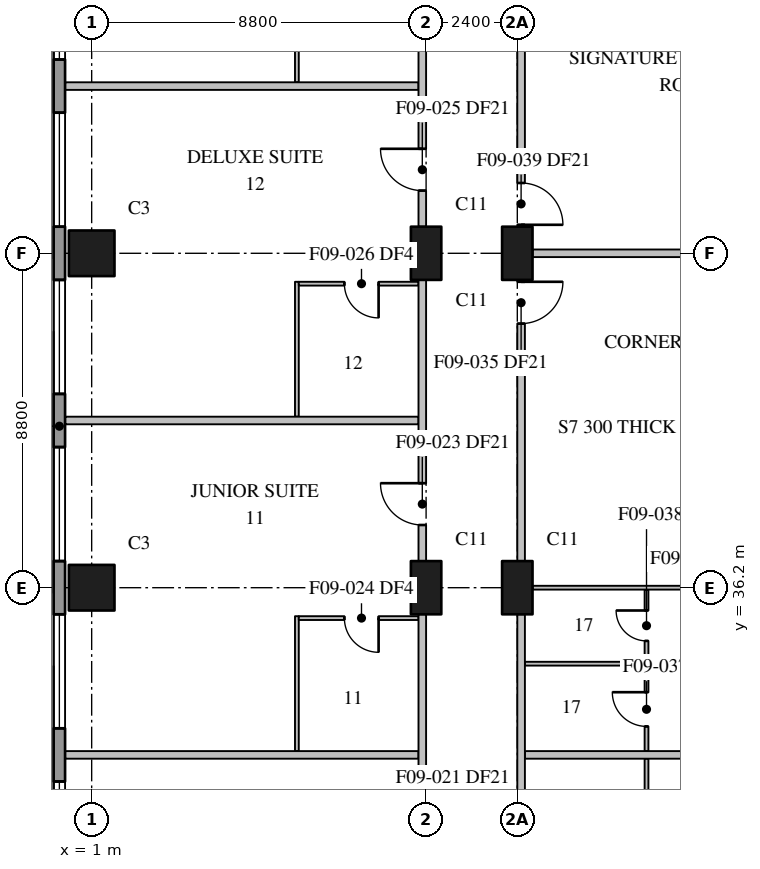
"""IFC4 building model, lengths in metres.
Left out: names, types, materials, properties, quantities, classifications, styles, units other than length and angle.
Written with IfcOpenShell. Run it as: python <this file> out.ifc"""

import sys

from ifc_helpers import new_model, si_unit, direction, frame, frame_2d, origin, origin_2d, place, context, subcontext, project, spatial, rectangle, extrude, element, fill, save


model = new_model("IFC4")
c1 = context("Model", 3, precision=1e-05, world=origin(), true_north=direction((0.0, 1.0)))
c2 = subcontext(c1, "Body", "Model", "MODEL_VIEW")
j1 = project(units=[si_unit("LENGTHUNIT", "METRE"), si_unit("PLANEANGLEUNIT", "RADIAN")], contexts=[c1])
p1 = place(None, origin())
s1 = spatial("IfcSite", under=j1, at=p1, CompositionType="ELEMENT")
p2 = place(p1, origin())
s2 = spatial("IfcBuilding", under=s1, at=p2, CompositionType="ELEMENT")
p3 = place(p2, frame((0.0, 0.0, 98.2)))
s3 = spatial("IfcBuildingStorey", under=s2, at=p3, CompositionType="ELEMENT", Elevation=98.2)
for number, where, z_axis, x_axis in (
    (1, (1.0, 36.2, 0.0), (0.0, 0.0, 1.0), (1.0, 0.0, 0.0)),
    (2, (1.0, 45.0, 0.0), (0.0, 0.0, 1.0), (1.0, 0.0, 0.0)),
):
    element("IfcColumn", number, at=place(p3, frame(where, z_axis=z_axis, x_axis=x_axis)), inside=s3, PredefinedType="COLUMN", context=c2, shape_type="SweptSolid", body=[
        extrude(rectangle(XDim=1.2, YDim=1.2, at=origin_2d()), origin(), (0.0, 0.0, 1.0), 3.7),
    ])
for number, where, z_axis, x_axis in (
    (3, (9.8, 36.2, 0.0), (0.0, 0.0, 1.0), (0.0, 1.0, 0.0)),
    (4, (9.8, 45.0, 0.0), (0.0, 0.0, 1.0), (0.0, 1.0, 0.0)),
    (5, (12.2, 36.2, 0.0), (0.0, 0.0, 1.0), (0.0, 1.0, 0.0)),
    (6, (12.2, 45.0, 0.0), (0.0, 0.0, 1.0), (0.0, 1.0, 0.0)),
):
    element("IfcColumn", number, at=place(p3, frame(where, z_axis=z_axis, x_axis=x_axis)), inside=s3, PredefinedType="COLUMN", context=c2, shape_type="SweptSolid", body=[
        extrude(rectangle(XDim=1.4, YDim=0.8, at=origin_2d()), origin(), (0.0, 0.0, 1.0), 3.7),
    ])
p4 = place(p3, frame((0.15, 78.7, 0.0), z_axis=(0.0, 0.0, 1.0), x_axis=(0.0, -1.0, 0.0)))
e7 = element("IfcWall", 7, at=p4, inside=s3, PredefinedType="STANDARD", context=c2, shape_type="SweptSolid", body=[
    extrude(rectangle(XDim=76.5, YDim=0.3, at=frame_2d((38.25, 0.0))), origin(), (0.0, 0.0, 1.0), 3.3),
])
p5 = place(p4, frame((3.6, 0.0, 0.75)))
e8 = element("IfcOpeningElement", 8, at=p5, cuts=e7, PredefinedType="OPENING", context=c2, shape_type="SweptSolid", body=[
    extrude(rectangle(XDim=3.0, YDim=2.3, at=frame_2d((1.5, 1.15))), frame((0.0, 0.16, 0.0), z_axis=(0.0, -1.0, 0.0), x_axis=(1.0, 0.0, 0.0)), (0.0, 0.0, 1.0), 0.32),
])
p6 = place(p4, frame((8.0, 0.0, 0.75)))
e9 = element("IfcOpeningElement", 9, at=p6, cuts=e7, PredefinedType="OPENING", context=c2, shape_type="SweptSolid", body=[
    extrude(rectangle(XDim=3.0, YDim=2.3, at=frame_2d((1.5, 1.15))), frame((0.0, 0.16, 0.0), z_axis=(0.0, -1.0, 0.0), x_axis=(1.0, 0.0, 0.0)), (0.0, 0.0, 1.0), 0.32),
])
p7 = place(p4, frame((12.4, 0.0, 0.75)))
e10 = element("IfcOpeningElement", 10, at=p7, cuts=e7, PredefinedType="OPENING", context=c2, shape_type="SweptSolid", body=[
    extrude(rectangle(XDim=3.0, YDim=2.3, at=frame_2d((1.5, 1.15))), frame((0.0, 0.16, 0.0), z_axis=(0.0, -1.0, 0.0), x_axis=(1.0, 0.0, 0.0)), (0.0, 0.0, 1.0), 0.32),
])
p8 = place(p4, frame((16.8, 0.0, 0.75)))
e11 = element("IfcOpeningElement", 11, at=p8, cuts=e7, PredefinedType="OPENING", context=c2, shape_type="SweptSolid", body=[
    extrude(rectangle(XDim=3.0, YDim=2.3, at=frame_2d((1.5, 1.15))), frame((0.0, 0.16, 0.0), z_axis=(0.0, -1.0, 0.0), x_axis=(1.0, 0.0, 0.0)), (0.0, 0.0, 1.0), 0.32),
])
p9 = place(p4, frame((21.2, 0.0, 0.75)))
e12 = element("IfcOpeningElement", 12, at=p9, cuts=e7, PredefinedType="OPENING", context=c2, shape_type="SweptSolid", body=[
    extrude(rectangle(XDim=3.0, YDim=2.3, at=frame_2d((1.5, 1.15))), frame((0.0, 0.16, 0.0), z_axis=(0.0, -1.0, 0.0), x_axis=(1.0, 0.0, 0.0)), (0.0, 0.0, 1.0), 0.32),
])
p10 = place(p4, frame((25.6, 0.0, 0.75)))
e13 = element("IfcOpeningElement", 13, at=p10, cuts=e7, PredefinedType="OPENING", context=c2, shape_type="SweptSolid", body=[
    extrude(rectangle(XDim=3.0, YDim=2.3, at=frame_2d((1.5, 1.15))), frame((0.0, 0.16, 0.0), z_axis=(0.0, -1.0, 0.0), x_axis=(1.0, 0.0, 0.0)), (0.0, 0.0, 1.0), 0.32),
])
p11 = place(p4, frame((30.0, 0.0, 0.75)))
e14 = element("IfcOpeningElement", 14, at=p11, cuts=e7, PredefinedType="OPENING", context=c2, shape_type="SweptSolid", body=[
    extrude(rectangle(XDim=3.0, YDim=2.3, at=frame_2d((1.5, 1.15))), frame((0.0, 0.16, 0.0), z_axis=(0.0, -1.0, 0.0), x_axis=(1.0, 0.0, 0.0)), (0.0, 0.0, 1.0), 0.32),
])
p12 = place(p4, frame((34.4, 0.0, 0.75)))
e15 = element("IfcOpeningElement", 15, at=p12, cuts=e7, PredefinedType="OPENING", context=c2, shape_type="SweptSolid", body=[
    extrude(rectangle(XDim=3.0, YDim=2.3, at=frame_2d((1.5, 1.15))), frame((0.0, 0.16, 0.0), z_axis=(0.0, -1.0, 0.0), x_axis=(1.0, 0.0, 0.0)), (0.0, 0.0, 1.0), 0.32),
])
p13 = place(p4, frame((38.8, 0.0, 0.75)))
e16 = element("IfcOpeningElement", 16, at=p13, cuts=e7, PredefinedType="OPENING", context=c2, shape_type="SweptSolid", body=[
    extrude(rectangle(XDim=3.0, YDim=2.3, at=frame_2d((1.5, 1.15))), frame((0.0, 0.16, 0.0), z_axis=(0.0, -1.0, 0.0), x_axis=(1.0, 0.0, 0.0)), (0.0, 0.0, 1.0), 0.32),
])
p14 = place(p4, frame((43.2, 0.0, 0.75)))
e17 = element("IfcOpeningElement", 17, at=p14, cuts=e7, PredefinedType="OPENING", context=c2, shape_type="SweptSolid", body=[
    extrude(rectangle(XDim=3.0, YDim=2.3, at=frame_2d((1.5, 1.15))), frame((0.0, 0.16, 0.0), z_axis=(0.0, -1.0, 0.0), x_axis=(1.0, 0.0, 0.0)), (0.0, 0.0, 1.0), 0.32),
])
p15 = place(p4, frame((47.6, 0.0, 0.75)))
e18 = element("IfcOpeningElement", 18, at=p15, cuts=e7, PredefinedType="OPENING", context=c2, shape_type="SweptSolid", body=[
    extrude(rectangle(XDim=3.0, YDim=2.3, at=frame_2d((1.5, 1.15))), frame((0.0, 0.16, 0.0), z_axis=(0.0, -1.0, 0.0), x_axis=(1.0, 0.0, 0.0)), (0.0, 0.0, 1.0), 0.32),
])
p16 = place(p4, frame((52.0, 0.0, 0.75)))
e19 = element("IfcOpeningElement", 19, at=p16, cuts=e7, PredefinedType="OPENING", context=c2, shape_type="SweptSolid", body=[
    extrude(rectangle(XDim=3.0, YDim=2.3, at=frame_2d((1.5, 1.15))), frame((0.0, 0.16, 0.0), z_axis=(0.0, -1.0, 0.0), x_axis=(1.0, 0.0, 0.0)), (0.0, 0.0, 1.0), 0.32),
])
p17 = place(p4, frame((56.4, 0.0, 0.75)))
e20 = element("IfcOpeningElement", 20, at=p17, cuts=e7, PredefinedType="OPENING", context=c2, shape_type="SweptSolid", body=[
    extrude(rectangle(XDim=3.0, YDim=2.3, at=frame_2d((1.5, 1.15))), frame((0.0, 0.16, 0.0), z_axis=(0.0, -1.0, 0.0), x_axis=(1.0, 0.0, 0.0)), (0.0, 0.0, 1.0), 0.32),
])
p18 = place(p4, frame((60.8, 0.0, 0.75)))
e21 = element("IfcOpeningElement", 21, at=p18, cuts=e7, PredefinedType="OPENING", context=c2, shape_type="SweptSolid", body=[
    extrude(rectangle(XDim=3.0, YDim=2.3, at=frame_2d((1.5, 1.15))), frame((0.0, 0.16, 0.0), z_axis=(0.0, -1.0, 0.0), x_axis=(1.0, 0.0, 0.0)), (0.0, 0.0, 1.0), 0.32),
])
p19 = place(p4, frame((65.2, 0.0, 0.75)))
e22 = element("IfcOpeningElement", 22, at=p19, cuts=e7, PredefinedType="OPENING", context=c2, shape_type="SweptSolid", body=[
    extrude(rectangle(XDim=3.0, YDim=2.3, at=frame_2d((1.5, 1.15))), frame((0.0, 0.16, 0.0), z_axis=(0.0, -1.0, 0.0), x_axis=(1.0, 0.0, 0.0)), (0.0, 0.0, 1.0), 0.32),
])
p20 = place(p4, frame((69.6, 0.0, 0.75)))
e23 = element("IfcOpeningElement", 23, at=p20, cuts=e7, PredefinedType="OPENING", context=c2, shape_type="SweptSolid", body=[
    extrude(rectangle(XDim=3.0, YDim=2.3, at=frame_2d((1.5, 1.15))), frame((0.0, 0.16, 0.0), z_axis=(0.0, -1.0, 0.0), x_axis=(1.0, 0.0, 0.0)), (0.0, 0.0, 1.0), 0.32),
])
p21 = place(p3, frame((9.7, 28.1, 0.0), z_axis=(0.0, 0.0, 1.0), x_axis=(0.0, 1.0, 0.0)))
e24 = element("IfcWall", 24, at=p21, inside=s3, PredefinedType="PARTITIONING", context=c2, shape_type="SweptSolid", body=[
    extrude(rectangle(XDim=7.4, YDim=0.2, at=frame_2d((3.7, 0.0))), origin(), (0.0, 0.0, 1.0), 3.3),
])
p22 = place(p21, frame((0.95, 0.0, 0.0)))
e25 = element("IfcOpeningElement", 25, at=p22, cuts=e24, PredefinedType="OPENING", context=c2, shape_type="SweptSolid", body=[
    extrude(rectangle(XDim=1.1, YDim=2.1, at=frame_2d((0.55, 1.05))), frame((0.0, 0.11, 0.0), z_axis=(0.0, -1.0, 0.0), x_axis=(1.0, 0.0, 0.0)), (0.0, 0.0, 1.0), 0.22),
])
p23 = place(p3, frame((9.7, 36.9, 0.0), z_axis=(0.0, 0.0, 1.0), x_axis=(0.0, 1.0, 0.0)))
e26 = element("IfcWall", 26, at=p23, inside=s3, PredefinedType="PARTITIONING", context=c2, shape_type="SweptSolid", body=[
    extrude(rectangle(XDim=7.4, YDim=0.2, at=frame_2d((3.7, 0.0))), origin(), (0.0, 0.0, 1.0), 3.3),
])
p24 = place(p23, frame((0.95, 0.0, 0.0)))
e27 = element("IfcOpeningElement", 27, at=p24, cuts=e26, PredefinedType="OPENING", context=c2, shape_type="SweptSolid", body=[
    extrude(rectangle(XDim=1.1, YDim=2.1, at=frame_2d((0.55, 1.05))), frame((0.0, 0.11, 0.0), z_axis=(0.0, -1.0, 0.0), x_axis=(1.0, 0.0, 0.0)), (0.0, 0.0, 1.0), 0.22),
])
p25 = place(p3, frame((9.7, 45.7, 0.0), z_axis=(0.0, 0.0, 1.0), x_axis=(0.0, 1.0, 0.0)))
e28 = element("IfcWall", 28, at=p25, inside=s3, PredefinedType="PARTITIONING", context=c2, shape_type="SweptSolid", body=[
    extrude(rectangle(XDim=7.4, YDim=0.2, at=frame_2d((3.7, 0.0))), origin(), (0.0, 0.0, 1.0), 3.3),
])
p26 = place(p25, frame((0.95, 0.0, 0.0)))
e29 = element("IfcOpeningElement", 29, at=p26, cuts=e28, PredefinedType="OPENING", context=c2, shape_type="SweptSolid", body=[
    extrude(rectangle(XDim=1.1, YDim=2.1, at=frame_2d((0.55, 1.05))), frame((0.0, 0.11, 0.0), z_axis=(0.0, -1.0, 0.0), x_axis=(1.0, 0.0, 0.0)), (0.0, 0.0, 1.0), 0.22),
])
p27 = place(p3, frame((0.31, 31.8, 0.0), z_axis=(0.0, 0.0, 1.0), x_axis=(1.0, 0.0, 0.0)))
e30 = element("IfcWall", 30, at=p27, inside=s3, PredefinedType="PARTITIONING", context=c2, shape_type="SweptSolid", body=[
    extrude(rectangle(XDim=9.29, YDim=0.2, at=frame_2d((4.645, 0.0))), origin(), (0.0, 0.0, 1.0), 3.3),
])
p28 = place(p3, frame((12.4, 31.8, 0.0), z_axis=(0.0, 0.0, 1.0), x_axis=(1.0, 0.0, 0.0)))
e31 = element("IfcWall", 31, at=p28, inside=s3, PredefinedType="PARTITIONING", context=c2, shape_type="SweptSolid", body=[
    extrude(rectangle(XDim=14.27, YDim=0.2, at=frame_2d((7.135, 0.0))), origin(), (0.0, 0.0, 1.0), 3.3),
])
for number, where, z_axis, x_axis in (
    (32, (0.31, 40.6, 0.0), (0.0, 0.0, 1.0), (1.0, 0.0, 0.0)),
    (33, (0.31, 49.4, 0.0), (0.0, 0.0, 1.0), (1.0, 0.0, 0.0)),
):
    element("IfcWall", number, at=place(p3, frame(where, z_axis=z_axis, x_axis=x_axis)), inside=s3, PredefinedType="PARTITIONING", context=c2, shape_type="SweptSolid", body=[
        extrude(rectangle(XDim=9.29, YDim=0.2, at=frame_2d((4.645, 0.0))), origin(), (0.0, 0.0, 1.0), 3.3),
    ])
p29 = place(p3, frame((12.3, 28.1, 0.0), z_axis=(0.0, 0.0, 1.0), x_axis=(0.0, 1.0, 0.0)))
e34 = element("IfcWall", 34, at=p29, inside=s3, PredefinedType="PARTITIONING", context=c2, shape_type="SweptSolid", body=[
    extrude(rectangle(XDim=7.4, YDim=0.2, at=frame_2d((3.7, 0.0))), origin(), (0.0, 0.0, 1.0), 3.3),
])
p30 = place(p3, frame((12.3, 44.3, 0.0), z_axis=(0.0, 0.0, 1.0), x_axis=(0.0, -1.0, 0.0)))
e35 = element("IfcWall", 35, at=p30, inside=s3, PredefinedType="PARTITIONING", context=c2, shape_type="SweptSolid", body=[
    extrude(rectangle(XDim=7.4, YDim=0.2, at=frame_2d((3.7, 0.0))), origin(), (0.0, 0.0, 1.0), 3.3),
])
p31 = place(p30, frame((0.05, 0.0, 0.0)))
e36 = element("IfcOpeningElement", 36, at=p31, cuts=e35, PredefinedType="OPENING", context=c2, shape_type="SweptSolid", body=[
    extrude(rectangle(XDim=1.1, YDim=2.1, at=frame_2d((0.55, 1.05))), frame((0.0, 0.11, 0.0), z_axis=(0.0, -1.0, 0.0), x_axis=(1.0, 0.0, 0.0)), (0.0, 0.0, 1.0), 0.22),
])
p32 = place(p3, frame((12.3, 53.1, 0.0), z_axis=(0.0, 0.0, 1.0), x_axis=(0.0, -1.0, 0.0)))
e37 = element("IfcWall", 37, at=p32, inside=s3, PredefinedType="PARTITIONING", context=c2, shape_type="SweptSolid", body=[
    extrude(rectangle(XDim=7.4, YDim=0.2, at=frame_2d((3.7, 0.0))), origin(), (0.0, 0.0, 1.0), 3.3),
])
p33 = place(p32, frame((6.25, 0.0, 0.0)))
e38 = element("IfcOpeningElement", 38, at=p33, cuts=e37, PredefinedType="OPENING", context=c2, shape_type="SweptSolid", body=[
    extrude(rectangle(XDim=1.1, YDim=2.1, at=frame_2d((0.55, 1.05))), frame((0.0, 0.11, 0.0), z_axis=(0.0, -1.0, 0.0), x_axis=(1.0, 0.0, 0.0)), (0.0, 0.0, 1.0), 0.22),
])
p34 = place(p3, frame((12.6, 45.0, 0.0), z_axis=(0.0, 0.0, 1.0), x_axis=(1.0, 0.0, 0.0)))
e39 = element("IfcWall", 39, at=p34, inside=s3, PredefinedType="PARTITIONING", context=c2, shape_type="SweptSolid", body=[
    extrude(rectangle(XDim=7.8, YDim=0.2, at=frame_2d((3.9, 0.0))), origin(), (0.0, 0.0, 1.0), 3.3),
])
for number, where, z_axis, x_axis in (
    (40, (6.4, 31.9, 0.0), (0.0, 0.0, 1.0), (0.0, 1.0, 0.0)),
    (41, (6.4, 40.7, 0.0), (0.0, 0.0, 1.0), (0.0, 1.0, 0.0)),
    (42, (6.4, 49.5, 0.0), (0.0, 0.0, 1.0), (0.0, 1.0, 0.0)),
):
    element("IfcWall", number, at=place(p3, frame(where, z_axis=z_axis, x_axis=x_axis)), inside=s3, PredefinedType="PARTITIONING", context=c2, shape_type="SweptSolid", body=[
        extrude(rectangle(XDim=3.55, YDim=0.1, at=frame_2d((1.775, 0.0))), origin(), (0.0, 0.0, 1.0), 3.3),
    ])
p35 = place(p3, frame((9.6, 35.4, 0.0), z_axis=(0.0, 0.0, 1.0), x_axis=(-1.0, 0.0, 0.0)))
e43 = element("IfcWall", 43, at=p35, inside=s3, PredefinedType="PARTITIONING", context=c2, shape_type="SweptSolid", body=[
    extrude(rectangle(XDim=3.15, YDim=0.1, at=frame_2d((1.575, 0.0))), origin(), (0.0, 0.0, 1.0), 3.3),
])
p36 = place(p35, frame((1.05, 0.0, 0.0)))
e44 = element("IfcOpeningElement", 44, at=p36, cuts=e43, PredefinedType="OPENING", context=c2, shape_type="SweptSolid", body=[
    extrude(rectangle(XDim=0.9, YDim=2.1, at=frame_2d((0.45, 1.05))), frame((0.0, 0.06, 0.0), z_axis=(0.0, -1.0, 0.0), x_axis=(1.0, 0.0, 0.0)), (0.0, 0.0, 1.0), 0.12),
])
p37 = place(p3, frame((9.6, 44.2, 0.0), z_axis=(0.0, 0.0, 1.0), x_axis=(-1.0, 0.0, 0.0)))
e45 = element("IfcWall", 45, at=p37, inside=s3, PredefinedType="PARTITIONING", context=c2, shape_type="SweptSolid", body=[
    extrude(rectangle(XDim=3.15, YDim=0.1, at=frame_2d((1.575, 0.0))), origin(), (0.0, 0.0, 1.0), 3.3),
])
p38 = place(p37, frame((1.05, 0.0, 0.0)))
e46 = element("IfcOpeningElement", 46, at=p38, cuts=e45, PredefinedType="OPENING", context=c2, shape_type="SweptSolid", body=[
    extrude(rectangle(XDim=0.9, YDim=2.1, at=frame_2d((0.45, 1.05))), frame((0.0, 0.06, 0.0), z_axis=(0.0, -1.0, 0.0), x_axis=(1.0, 0.0, 0.0)), (0.0, 0.0, 1.0), 0.12),
])
p39 = place(p3, frame((15.6, 28.15, 0.0), z_axis=(0.0, 0.0, 1.0), x_axis=(0.0, 1.0, 0.0)))
e47 = element("IfcWall", 47, at=p39, inside=s3, PredefinedType="PARTITIONING", context=c2, shape_type="SweptSolid", body=[
    extrude(rectangle(XDim=3.55, YDim=0.1, at=frame_2d((1.775, 0.0))), origin(), (0.0, 0.0, 1.0), 3.3),
])
p40 = place(p3, frame((15.6, 31.9, 0.0), z_axis=(0.0, 0.0, 1.0), x_axis=(0.0, 1.0, 0.0)))
e48 = element("IfcWall", 48, at=p40, inside=s3, PredefinedType="PARTITIONING", context=c2, shape_type="SweptSolid", body=[
    extrude(rectangle(XDim=4.25, YDim=0.1, at=frame_2d((2.125, 0.0))), origin(), (0.0, 0.0, 1.0), 3.3),
])
p41 = place(p40, frame((0.65, 0.0, 0.0)))
e49 = element("IfcOpeningElement", 49, at=p41, cuts=e48, PredefinedType="OPENING", context=c2, shape_type="SweptSolid", body=[
    extrude(rectangle(XDim=0.9, YDim=2.1, at=frame_2d((0.45, 1.05))), frame((0.0, 0.06, 0.0), z_axis=(0.0, -1.0, 0.0), x_axis=(1.0, 0.0, 0.0)), (0.0, 0.0, 1.0), 0.12),
])
p42 = place(p40, frame((2.9, 0.0, 0.0)))
e50 = element("IfcOpeningElement", 50, at=p42, cuts=e48, PredefinedType="OPENING", context=c2, shape_type="SweptSolid", body=[
    extrude(rectangle(XDim=0.8, YDim=2.1, at=frame_2d((0.4, 1.05))), frame((0.0, 0.06, 0.0), z_axis=(0.0, -1.0, 0.0), x_axis=(1.0, 0.0, 0.0)), (0.0, 0.0, 1.0), 0.12),
])
p43 = place(p3, frame((20.4, 36.2, 0.0), z_axis=(0.0, 0.0, 1.0), x_axis=(-1.0, 0.0, 0.0)))
e51 = element("IfcWall", 51, at=p43, inside=s3, PredefinedType="PARTITIONING", context=c2, shape_type="SweptSolid", body=[
    extrude(rectangle(XDim=7.8, YDim=0.1, at=frame_2d((3.9, 0.0))), origin(), (0.0, 0.0, 1.0), 3.3),
])
p44 = place(p43, frame((2.7, 0.0, 0.0)))
e52 = element("IfcOpeningElement", 52, at=p44, cuts=e51, PredefinedType="OPENING", context=c2, shape_type="SweptSolid", body=[
    extrude(rectangle(XDim=1.0, YDim=2.1, at=frame_2d((0.5, 1.05))), frame((0.0, 0.06, 0.0), z_axis=(0.0, -1.0, 0.0), x_axis=(1.0, 0.0, 0.0)), (0.0, 0.0, 1.0), 0.12),
])
p45 = place(p3, frame((12.4, 34.2, 0.0), z_axis=(0.0, 0.0, 1.0), x_axis=(1.0, 0.0, 0.0)))
e53 = element("IfcWall", 53, at=p45, inside=s3, PredefinedType="PARTITIONING", context=c2, shape_type="SweptSolid", body=[
    extrude(rectangle(XDim=3.15, YDim=0.1, at=frame_2d((1.575, 0.0))), origin(), (0.0, 0.0, 1.0), 3.3),
])
p46 = place(p10, origin())
e54 = element("IfcWindow", 54, at=p46, inside=s3, PartitioningType="SINGLE_PANEL", PredefinedType="WINDOW", context=c2, shape_type="SweptSolid", body=[
    extrude(rectangle(XDim=3.0, YDim=2.3, at=frame_2d((1.5, 1.15))), frame((0.0, 0.03, 0.0), z_axis=(0.0, -1.0, 0.0), x_axis=(1.0, 0.0, 0.0)), (0.0, 0.0, 1.0), 0.06),
])
fill(e13, e54)
p47 = place(p11, origin())
e55 = element("IfcWindow", 55, at=p47, inside=s3, PartitioningType="SINGLE_PANEL", PredefinedType="WINDOW", context=c2, shape_type="SweptSolid", body=[
    extrude(rectangle(XDim=3.0, YDim=2.3, at=frame_2d((1.5, 1.15))), frame((0.0, 0.03, 0.0), z_axis=(0.0, -1.0, 0.0), x_axis=(1.0, 0.0, 0.0)), (0.0, 0.0, 1.0), 0.06),
])
fill(e14, e55)
p48 = place(p12, origin())
e56 = element("IfcWindow", 56, at=p48, inside=s3, PartitioningType="SINGLE_PANEL", PredefinedType="WINDOW", context=c2, shape_type="SweptSolid", body=[
    extrude(rectangle(XDim=3.0, YDim=2.3, at=frame_2d((1.5, 1.15))), frame((0.0, 0.03, 0.0), z_axis=(0.0, -1.0, 0.0), x_axis=(1.0, 0.0, 0.0)), (0.0, 0.0, 1.0), 0.06),
])
fill(e15, e56)
p49 = place(p13, origin())
e57 = element("IfcWindow", 57, at=p49, inside=s3, PartitioningType="SINGLE_PANEL", PredefinedType="WINDOW", context=c2, shape_type="SweptSolid", body=[
    extrude(rectangle(XDim=3.0, YDim=2.3, at=frame_2d((1.5, 1.15))), frame((0.0, 0.03, 0.0), z_axis=(0.0, -1.0, 0.0), x_axis=(1.0, 0.0, 0.0)), (0.0, 0.0, 1.0), 0.06),
])
fill(e16, e57)
p50 = place(p14, origin())
e58 = element("IfcWindow", 58, at=p50, inside=s3, PartitioningType="SINGLE_PANEL", PredefinedType="WINDOW", context=c2, shape_type="SweptSolid", body=[
    extrude(rectangle(XDim=3.0, YDim=2.3, at=frame_2d((1.5, 1.15))), frame((0.0, 0.03, 0.0), z_axis=(0.0, -1.0, 0.0), x_axis=(1.0, 0.0, 0.0)), (0.0, 0.0, 1.0), 0.06),
])
fill(e17, e58)
p51 = place(p15, origin())
e59 = element("IfcWindow", 59, at=p51, inside=s3, PartitioningType="SINGLE_PANEL", PredefinedType="WINDOW", context=c2, shape_type="SweptSolid", body=[
    extrude(rectangle(XDim=3.0, YDim=2.3, at=frame_2d((1.5, 1.15))), frame((0.0, 0.03, 0.0), z_axis=(0.0, -1.0, 0.0), x_axis=(1.0, 0.0, 0.0)), (0.0, 0.0, 1.0), 0.06),
])
fill(e18, e59)
p52 = place(p24, origin())
e60 = element("IfcDoor", 60, at=p52, inside=s3, OperationType="SINGLE_SWING_RIGHT", PredefinedType="DOOR", context=c2, shape_type="SweptSolid", body=[
    extrude(rectangle(XDim=1.1, YDim=2.1, at=frame_2d((0.55, 1.05))), frame((0.0, 0.025, 0.0), z_axis=(0.0, -1.0, 0.0), x_axis=(1.0, 0.0, 0.0)), (0.0, 0.0, 1.0), 0.05),
])
fill(e27, e60)
p53 = place(p36, origin())
e61 = element("IfcDoor", 61, at=p53, inside=s3, OperationType="SINGLE_SWING_LEFT", PredefinedType="DOOR", context=c2, shape_type="SweptSolid", body=[
    extrude(rectangle(XDim=0.9, YDim=2.1, at=frame_2d((0.45, 1.05))), frame((0.0, 0.025, 0.0), z_axis=(0.0, -1.0, 0.0), x_axis=(1.0, 0.0, 0.0)), (0.0, 0.0, 1.0), 0.05),
])
fill(e44, e61)
p54 = place(p26, origin())
e62 = element("IfcDoor", 62, at=p54, inside=s3, OperationType="SINGLE_SWING_RIGHT", PredefinedType="DOOR", context=c2, shape_type="SweptSolid", body=[
    extrude(rectangle(XDim=1.1, YDim=2.1, at=frame_2d((0.55, 1.05))), frame((0.0, 0.025, 0.0), z_axis=(0.0, -1.0, 0.0), x_axis=(1.0, 0.0, 0.0)), (0.0, 0.0, 1.0), 0.05),
])
fill(e29, e62)
p55 = place(p38, origin())
e63 = element("IfcDoor", 63, at=p55, inside=s3, OperationType="SINGLE_SWING_LEFT", PredefinedType="DOOR", context=c2, shape_type="SweptSolid", body=[
    extrude(rectangle(XDim=0.9, YDim=2.1, at=frame_2d((0.45, 1.05))), frame((0.0, 0.025, 0.0), z_axis=(0.0, -1.0, 0.0), x_axis=(1.0, 0.0, 0.0)), (0.0, 0.0, 1.0), 0.05),
])
fill(e46, e63)
p56 = place(p31, origin())
e64 = element("IfcDoor", 64, at=p56, inside=s3, OperationType="SINGLE_SWING_LEFT", PredefinedType="DOOR", context=c2, shape_type="SweptSolid", body=[
    extrude(rectangle(XDim=1.1, YDim=2.1, at=frame_2d((0.55, 1.05))), frame((0.0, 0.025, 0.0), z_axis=(0.0, -1.0, 0.0), x_axis=(1.0, 0.0, 0.0)), (0.0, 0.0, 1.0), 0.05),
])
fill(e36, e64)
p57 = place(p41, origin())
e65 = element("IfcDoor", 65, at=p57, inside=s3, OperationType="SINGLE_SWING_RIGHT", PredefinedType="DOOR", context=c2, shape_type="SweptSolid", body=[
    extrude(rectangle(XDim=0.9, YDim=2.1, at=frame_2d((0.45, 1.05))), frame((0.0, 0.025, 0.0), z_axis=(0.0, -1.0, 0.0), x_axis=(1.0, 0.0, 0.0)), (0.0, 0.0, 1.0), 0.05),
])
fill(e49, e65)
p58 = place(p42, origin())
e66 = element("IfcDoor", 66, at=p58, inside=s3, OperationType="SINGLE_SWING_RIGHT", PredefinedType="DOOR", context=c2, shape_type="SweptSolid", body=[
    extrude(rectangle(XDim=0.8, YDim=2.1, at=frame_2d((0.4, 1.05))), frame((0.0, 0.025, 0.0), z_axis=(0.0, -1.0, 0.0), x_axis=(1.0, 0.0, 0.0)), (0.0, 0.0, 1.0), 0.05),
])
fill(e50, e66)
p59 = place(p33, origin())
e67 = element("IfcDoor", 67, at=p59, inside=s3, OperationType="SINGLE_SWING_RIGHT", PredefinedType="DOOR", context=c2, shape_type="SweptSolid", body=[
    extrude(rectangle(XDim=1.1, YDim=2.1, at=frame_2d((0.55, 1.05))), frame((0.0, 0.025, 0.0), z_axis=(0.0, -1.0, 0.0), x_axis=(1.0, 0.0, 0.0)), (0.0, 0.0, 1.0), 0.05),
])
fill(e38, e67)
save(model, sys.argv[1])
